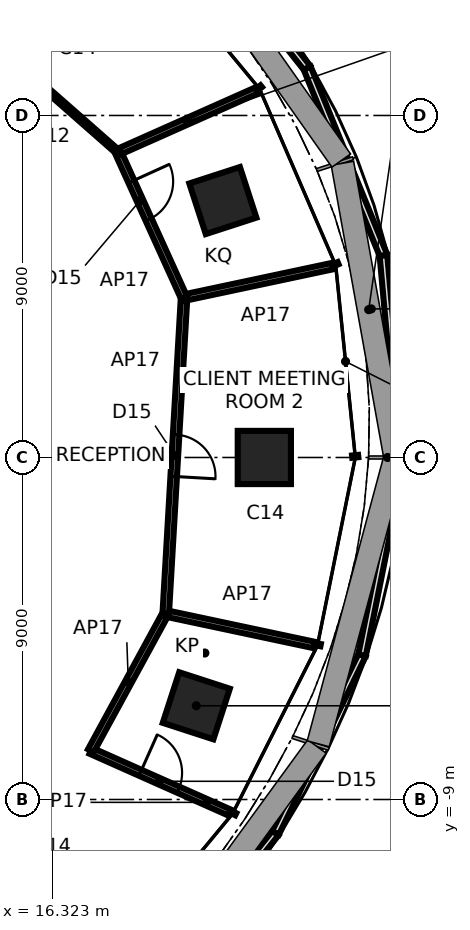
"""IFC4 building model, lengths in metres.
Left out: names, types, materials, properties, quantities, classifications, styles, units other than length and angle.
Written with IfcOpenShell. Run it as: python <this file> out.ifc"""

import sys

from ifc_helpers import new_model, si_unit, direction, frame, frame_2d, origin, origin_2d, place, context, subcontext, project, spatial, rectangle, extrude, element, fill, save


model = new_model("IFC4")
c1 = context("Model", 3, precision=1e-05, world=origin(), true_north=direction((0.0, 1.0)))
c2 = subcontext(c1, "Body", "Model", "MODEL_VIEW")
j1 = project(units=[si_unit("LENGTHUNIT", "METRE"), si_unit("PLANEANGLEUNIT", "RADIAN")], contexts=[c1])
p1 = place(None, origin())
s1 = spatial("IfcSite", under=j1, at=p1, CompositionType="ELEMENT")
p2 = place(p1, origin())
s2 = spatial("IfcBuilding", under=s1, at=p2, CompositionType="ELEMENT")
p3 = place(p2, frame((0.0, 0.0, 172.1)))
s3 = spatial("IfcBuildingStorey", under=s2, at=p3, CompositionType="ELEMENT", Elevation=172.1)
for number, where, z_axis, x_axis in (
    (1, (21.9, 0.0, 0.0), (0.0, 0.0, 1.0), (1.0, 0.0, 0.0)),
    (2, (20.808, 6.761, 0.0), (0.0, 0.0, 1.0), (0.951, 0.309, 0.0)),
    (3, (20.109, -6.534, 0.0), (0.0, 0.0, 1.0), (0.951, -0.309, 0.0)),
):
    element("IfcColumn", number, at=place(p3, frame(where, z_axis=z_axis, x_axis=x_axis)), inside=s3, PredefinedType="COLUMN", context=c2, shape_type="SweptSolid", body=[
        extrude(rectangle(XDim=1.4, YDim=1.4, at=origin_2d()), origin(), (0.0, 0.0, 1.0), 3.9),
    ])
p4 = place(p3, frame((25.512, 0.0, 0.0), z_axis=(0.0, 0.0, 1.0), x_axis=(-0.089522105657, 0.995984835526, 0.0)))
e4 = element("IfcWall", 4, at=p4, inside=s3, PredefinedType="PARAPET", context=c2, shape_type="SweptSolid", body=[
    extrude(rectangle(XDim=5.343, YDim=0.2, at=frame_2d((2.671, 0.0))), origin(), (0.0, 0.0, 1.0), 1.1),
])
p5 = place(p3, frame((25.034, 5.321, 0.0), z_axis=(0.0, 0.0, 1.0), x_axis=(-0.377234248765, 0.926117876708, 0.0)))
e5 = element("IfcWall", 5, at=p5, inside=s3, PredefinedType="PARAPET", context=c2, shape_type="SweptSolid", body=[
    extrude(rectangle(XDim=5.324, YDim=0.2, at=frame_2d((2.662, 0.0))), origin(), (0.0, 0.0, 1.0), 1.1),
])
p6 = place(p3, frame((23.025, 10.251, 0.0), z_axis=(0.0, 0.0, 1.0), x_axis=(-0.620234251815, 0.784416644951, 0.0)))
e6 = element("IfcWall", 6, at=p6, inside=s3, PredefinedType="PARAPET", context=c2, shape_type="SweptSolid", body=[
    extrude(rectangle(XDim=5.245, YDim=0.2, at=frame_2d((2.622, 0.0))), origin(), (0.0, 0.0, 1.0), 1.1),
])
p7 = place(p3, frame((19.054, -13.844, 0.0), z_axis=(0.0, 0.0, 1.0), x_axis=(0.620705418458, 0.784043865799, 0.0)))
e7 = element("IfcWall", 7, at=p7, inside=s3, PredefinedType="PARAPET", context=c2, shape_type="SweptSolid", body=[
    extrude(rectangle(XDim=5.055, YDim=0.2, at=frame_2d((2.527, 0.0))), origin(), (0.0, 0.0, 1.0), 1.1),
])
p8 = place(p3, frame((22.192, -9.88, 0.0), z_axis=(0.0, 0.0, 1.0), x_axis=(0.437939288828, 0.899004549099, 0.0)))
e8 = element("IfcWall", 8, at=p8, inside=s3, PredefinedType="PARAPET", context=c2, shape_type="SweptSolid", body=[
    extrude(rectangle(XDim=5.205, YDim=0.2, at=frame_2d((2.602, 0.0))), origin(), (0.0, 0.0, 1.0), 1.1),
])
p9 = place(p3, frame((24.471, -5.201, 0.0), z_axis=(0.0, 0.0, 1.0), x_axis=(0.196204643986, 0.980562969767, 0.0)))
e9 = element("IfcWall", 9, at=p9, inside=s3, PredefinedType="PARAPET", context=c2, shape_type="SweptSolid", body=[
    extrude(rectangle(XDim=5.304, YDim=0.2, at=frame_2d((2.652, 0.0))), origin(), (0.0, 0.0, 1.0), 1.1),
])
p10 = place(p3, frame((17.335, -7.718, 0.0), z_axis=(0.0, 0.0, 1.0), x_axis=(0.913549606868, -0.406727323635, 0.0)))
e10 = element("IfcWall", 10, at=p10, inside=s3, PredefinedType="PARTITIONING", context=c2, shape_type="SweptSolid", body=[
    extrude(rectangle(XDim=4.0, YDim=0.17, at=frame_2d((2.0, 0.0))), origin(), (0.0, 0.0, 1.0), 3.74),
])
p11 = place(p10, frame((1.424, 0.0, 0.0)))
e11 = element("IfcOpeningElement", 11, at=p11, cuts=e10, PredefinedType="OPENING", context=c2, shape_type="SweptSolid", body=[
    extrude(rectangle(XDim=1.1, YDim=2.4, at=frame_2d((0.55, 1.2))), frame((0.0, 0.095, 0.0), z_axis=(0.0, -1.0, 0.0), x_axis=(1.0, 0.0, 0.0)), (0.0, 0.0, 1.0), 0.19),
])
p12 = place(p3, frame((19.306, -4.104, 0.0), z_axis=(0.0, 0.0, 1.0), x_axis=(-0.478739945202, -0.877956755694, 0.0)))
e12 = element("IfcWall", 12, at=p12, inside=s3, PredefinedType="PARTITIONING", context=c2, shape_type="SweptSolid", body=[
    extrude(rectangle(XDim=4.117, YDim=0.17, at=frame_2d((2.059, 0.0))), origin(), (0.0, 0.0, 1.0), 3.74),
])
p13 = place(p3, frame((19.306, -4.104, 0.0), z_axis=(0.0, 0.0, 1.0), x_axis=(0.978137903693, -0.207957306576, 0.0)))
e13 = element("IfcWall", 13, at=p13, inside=s3, PredefinedType="PARTITIONING", context=c2, shape_type="SweptSolid", body=[
    extrude(rectangle(XDim=4.0, YDim=0.17, at=frame_2d((2.0, 0.0))), origin(), (0.0, 0.0, 1.0), 3.74),
])
p14 = place(p3, frame((19.788, 4.206, 0.0), z_axis=(0.0, 0.0, 1.0), x_axis=(-0.0579293499, -0.998320685161, 0.0)))
e14 = element("IfcWall", 14, at=p14, inside=s3, PredefinedType="PARTITIONING", context=c2, shape_type="SweptSolid", body=[
    extrude(rectangle(XDim=8.323, YDim=0.17, at=frame_2d((4.162, 0.0))), origin(), (0.0, 0.0, 1.0), 3.74),
])
p15 = place(p14, frame((3.612, 0.0, 0.0)))
e15 = element("IfcOpeningElement", 15, at=p15, cuts=e14, PredefinedType="OPENING", context=c2, shape_type="SweptSolid", body=[
    extrude(rectangle(XDim=1.1, YDim=2.4, at=frame_2d((0.55, 1.2))), frame((0.0, 0.095, 0.0), z_axis=(0.0, -1.0, 0.0), x_axis=(1.0, 0.0, 0.0)), (0.0, 0.0, 1.0), 0.19),
])
p16 = place(p3, frame((19.788, 4.206, 0.0), z_axis=(0.0, 0.0, 1.0), x_axis=(0.978152955943, 0.207886494942, 0.0)))
e16 = element("IfcWall", 16, at=p16, inside=s3, PredefinedType="PARTITIONING", context=c2, shape_type="SweptSolid", body=[
    extrude(rectangle(XDim=4.0, YDim=0.17, at=frame_2d((2.0, 0.0))), origin(), (0.0, 0.0, 1.0), 3.74),
])
p17 = place(p3, frame((18.049, 8.036, 0.0), z_axis=(0.0, 0.0, 1.0), x_axis=(0.413444314282, -0.910529405889, 0.0)))
e17 = element("IfcWall", 17, at=p17, inside=s3, PredefinedType="PARTITIONING", context=c2, shape_type="SweptSolid", body=[
    extrude(rectangle(XDim=4.206, YDim=0.17, at=frame_2d((2.103, 0.0))), origin(), (0.0, 0.0, 1.0), 3.74),
])
p18 = place(p17, frame((0.851, 0.0, 0.0)))
e18 = element("IfcOpeningElement", 18, at=p18, cuts=e17, PredefinedType="OPENING", context=c2, shape_type="SweptSolid", body=[
    extrude(rectangle(XDim=1.1, YDim=2.4, at=frame_2d((0.55, 1.2))), frame((0.0, 0.095, 0.0), z_axis=(0.0, -1.0, 0.0), x_axis=(1.0, 0.0, 0.0)), (0.0, 0.0, 1.0), 0.19),
])
p19 = place(p3, frame((18.049, 8.036, 0.0), z_axis=(0.0, 0.0, 1.0), x_axis=(0.913539509426, 0.406750002727, 0.0)))
e19 = element("IfcWall", 19, at=p19, inside=s3, PredefinedType="PARTITIONING", context=c2, shape_type="SweptSolid", body=[
    extrude(rectangle(XDim=4.0, YDim=0.17, at=frame_2d((2.0, 0.0))), origin(), (0.0, 0.0, 1.0), 3.74),
])
p20 = place(p3, frame((12.013, 13.342, 0.0), z_axis=(0.0, 0.0, 1.0), x_axis=(0.751063552333, -0.66022991477, 0.0)))
e20 = element("IfcWall", 20, at=p20, inside=s3, PredefinedType="PARTITIONING", context=c2, shape_type="SweptSolid", body=[
    extrude(rectangle(XDim=8.036, YDim=0.12, at=frame_2d((4.018, 0.0))), origin(), (0.0, 0.0, 1.0), 3.74),
])
p21 = place(p20, frame((3.518, 0.0, 0.0)))
e21 = element("IfcOpeningElement", 21, at=p21, cuts=e20, PredefinedType="OPENING", context=c2, shape_type="SweptSolid", body=[
    extrude(rectangle(XDim=1.0, YDim=2.4, at=frame_2d((0.5, 1.2))), frame((0.0, 0.07, 0.0), z_axis=(0.0, -1.0, 0.0), x_axis=(1.0, 0.0, 0.0)), (0.0, 0.0, 1.0), 0.14),
])
p22 = place(p11, origin())
e22 = element("IfcDoor", 22, at=p22, inside=s3, OperationType="SINGLE_SWING_LEFT", PredefinedType="DOOR", context=c2, shape_type="SweptSolid", body=[
    extrude(rectangle(XDim=1.1, YDim=2.4, at=frame_2d((0.55, 1.2))), frame((0.0, 0.025, 0.0), z_axis=(0.0, -1.0, 0.0), x_axis=(1.0, 0.0, 0.0)), (0.0, 0.0, 1.0), 0.05),
])
fill(e11, e22)
p23 = place(p15, origin())
e23 = element("IfcDoor", 23, at=p23, inside=s3, OperationType="SINGLE_SWING_RIGHT", PredefinedType="DOOR", context=c2, shape_type="SweptSolid", body=[
    extrude(rectangle(XDim=1.1, YDim=2.4, at=frame_2d((0.55, 1.2))), frame((0.0, 0.025, 0.0), z_axis=(0.0, -1.0, 0.0), x_axis=(1.0, 0.0, 0.0)), (0.0, 0.0, 1.0), 0.05),
])
fill(e15, e23)
p24 = place(p18, origin())
e24 = element("IfcDoor", 24, at=p24, inside=s3, OperationType="SINGLE_SWING_LEFT", PredefinedType="DOOR", context=c2, shape_type="SweptSolid", body=[
    extrude(rectangle(XDim=1.1, YDim=2.4, at=frame_2d((0.55, 1.2))), frame((0.0, 0.025, 0.0), z_axis=(0.0, -1.0, 0.0), x_axis=(1.0, 0.0, 0.0)), (0.0, 0.0, 1.0), 0.05),
])
fill(e18, e24)
save(model, sys.argv[1])
